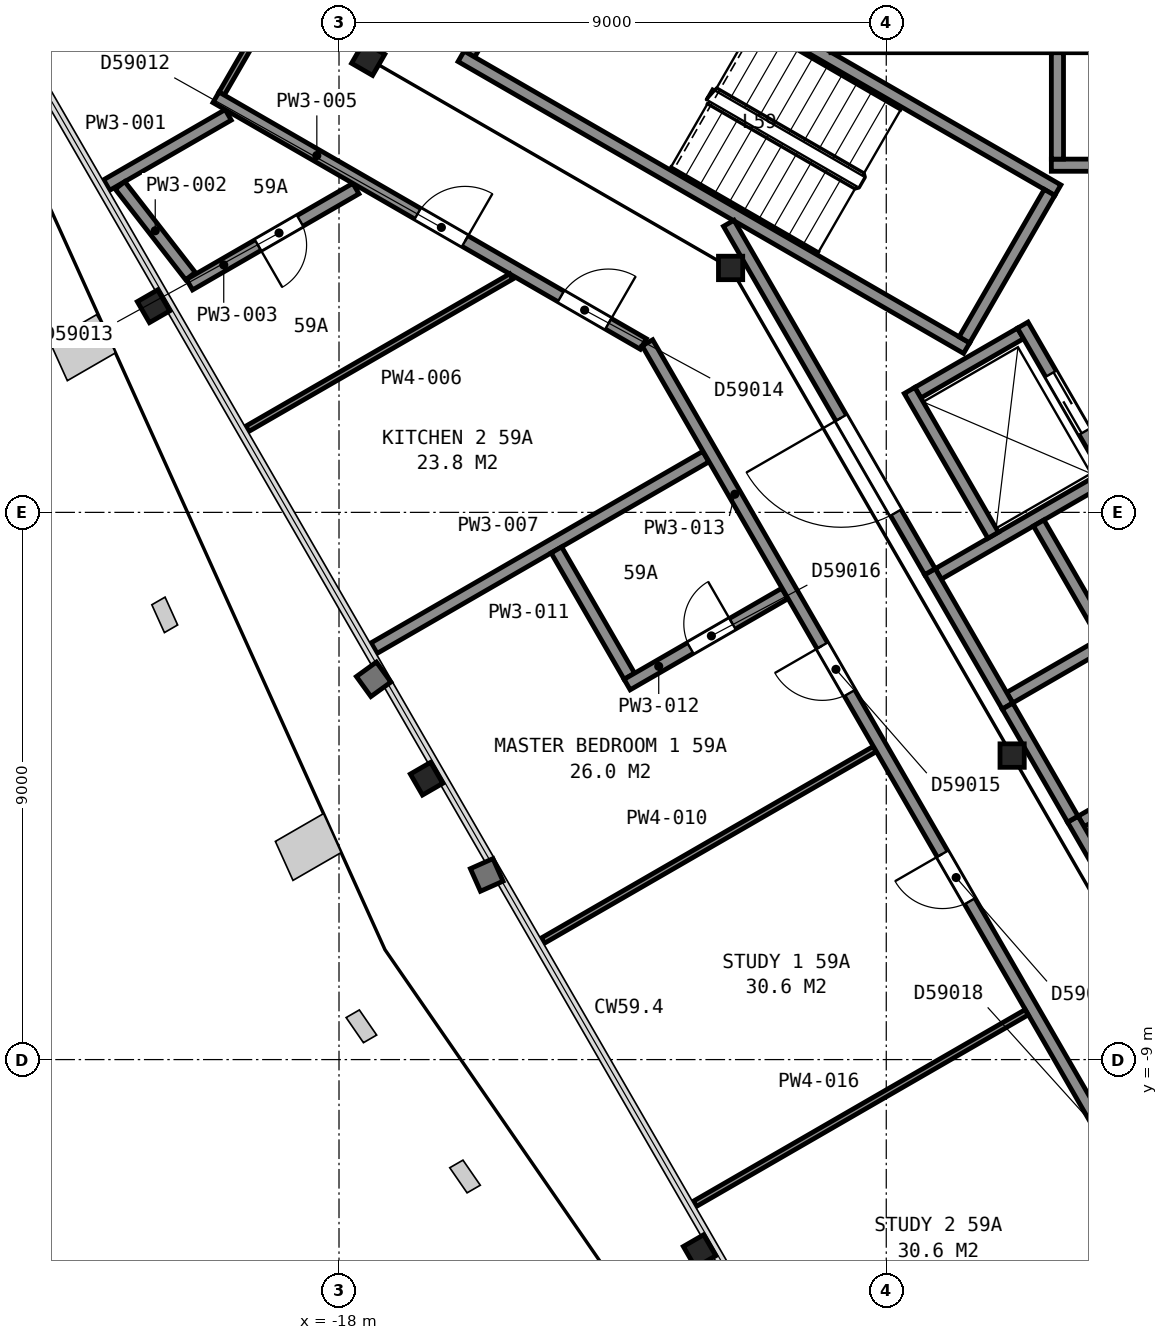
"""IFC4 building model, lengths in metres.
Left out: names, types, materials, properties, quantities, classifications, styles, units other than length and angle.
Written with IfcOpenShell. Run it as: python <this file> out.ifc"""

import sys

from ifc_helpers import new_model, si_unit, direction, frame, frame_2d, origin, origin_2d, place, context, subcontext, project, spatial, rectangle, i_section, extrude, element, fill, save


model = new_model("IFC4")
c1 = context("Model", 3, precision=1e-05, world=origin(), true_north=direction((0.0, 1.0)))
c2 = subcontext(c1, "Body", "Model", "MODEL_VIEW")
j1 = project(units=[si_unit("LENGTHUNIT", "METRE"), si_unit("PLANEANGLEUNIT", "RADIAN")], contexts=[c1])
p1 = place(None, origin())
s1 = spatial("IfcSite", under=j1, at=p1, CompositionType="ELEMENT")
p2 = place(p1, origin())
s2 = spatial("IfcBuilding", under=s1, at=p2, CompositionType="ELEMENT")
p3 = place(p2, frame((0.0, 0.0, 236.0)))
s3 = spatial("IfcBuildingStorey", under=s2, at=p3, CompositionType="ELEMENT", Elevation=236.0)
p4 = place(p3, frame((-21.05, 3.39, 0.04), z_axis=(0.0, 0.0, 1.0), x_axis=(-0.5, 0.866025403784, 0.0)))
e1 = element("IfcColumn", 1, at=p4, inside=s3, PredefinedType="COLUMN", context=c2, shape_type="SweptSolid", body=[
    extrude(i_section(OverallWidth=0.399, OverallDepth=0.386, WebThickness=0.021, FlangeThickness=0.033, FilletRadius=0.015, at=origin_2d()), origin(), (0.0, 0.0, 1.0), 3.66),
])
for number, where, z_axis, x_axis in (
    (2, (-16.56, -4.38, 0.035), (0.0, 0.0, 1.0), (-0.5, 0.866, 0.0)),
    (3, (-12.07, -12.15, 0.035), (0.0, 0.0, 1.0), (-0.5, 0.866, 0.0)),
):
    element("IfcColumn", number, at=place(p3, frame(where, z_axis=z_axis, x_axis=x_axis)), inside=s3, PredefinedType="COLUMN", context=c2, shape_type="SweptSolid", body=[
        extrude(i_section(OverallWidth=0.399, OverallDepth=0.386, WebThickness=0.021, FlangeThickness=0.033, FilletRadius=0.015, at=origin_2d()), origin(), (0.0, 0.0, 1.0), 3.665),
    ])
p5 = place(p3, frame((-17.52, 7.46, 0.0), z_axis=(0.0, 0.0, 1.0), x_axis=(0.5, 0.866025403784, 0.0)))
e4 = element("IfcColumn", 4, at=p5, inside=s3, PredefinedType="COLUMN", context=c2, shape_type="SweptSolid", body=[
    extrude(i_section(OverallWidth=0.401, OverallDepth=0.399, WebThickness=0.025, FlangeThickness=0.04, FilletRadius=0.015, at=origin_2d()), origin(), (0.0, 0.0, 1.0), 3.7),
])
for number, where, z_axis, x_axis in (
    (5, (-11.56, 4.02, 0.0), (0.0, 0.0, 1.0), (1.0, 0.0, 0.0)),
    (6, (-6.93, -4.0, 0.0), (0.0, 0.0, 1.0), (1.0, 0.0, 0.0)),
):
    element("IfcColumn", number, at=place(p3, frame(where, z_axis=z_axis, x_axis=x_axis)), inside=s3, PredefinedType="COLUMN", context=c2, shape_type="SweptSolid", body=[
        extrude(i_section(OverallWidth=0.399, OverallDepth=0.386, WebThickness=0.021, FlangeThickness=0.033, FilletRadius=0.015, at=origin_2d()), origin(), (0.0, 0.0, 1.0), 3.7),
    ])
p6 = place(p3, frame((-14.455, 9.962, 0.0), z_axis=(0.0, 0.0, 1.0), x_axis=(-0.500049511043, -0.865996816683, 0.0)))
e7 = element("IfcWall", 7, at=p6, inside=s3, PredefinedType="PARTITIONING", context=c2, shape_type="SweptSolid", body=[
    extrude(rectangle(XDim=2.8, YDim=0.2, at=frame_2d((1.4, 0.0))), origin(), (0.0, 0.0, 1.0), 3.45),
])
p7 = place(p6, frame((0.85, 0.0, 0.0)))
e8 = element("IfcOpeningElement", 8, at=p7, cuts=e7, PredefinedType="OPENING", context=c2, shape_type="SweptSolid", body=[
    extrude(rectangle(XDim=1.1, YDim=2.1, at=frame_2d((0.55, 1.05))), frame((0.0, 0.11, 0.0), z_axis=(0.0, -1.0, 0.0), x_axis=(1.0, 0.0, 0.0)), (0.0, 0.0, 1.0), 0.22),
])
for number, where, z_axis, x_axis in (
    (9, (-7.678, 2.701, 0.0), (0.0, 0.0, 1.0), (-0.866, 0.5, 0.0)),
    (10, (-6.178, 5.299, 0.0), (0.0, 0.0, 1.0), (-0.866, 0.5, 0.0)),
):
    element("IfcWall", number, at=place(p3, frame(where, z_axis=z_axis, x_axis=x_axis)), inside=s3, PredefinedType="PARTITIONING", context=c2, shape_type="SweptSolid", body=[
        extrude(rectangle(XDim=9.6, YDim=0.2, at=frame_2d((4.8, 0.0))), origin(), (0.0, 0.0, 1.0), 3.45),
    ])
p8 = place(p3, frame((-6.315, 5.262, 0.0), z_axis=(0.0, 0.0, 1.0), x_axis=(-0.500049511043, -0.865996816683, 0.0)))
e11 = element("IfcWall", 11, at=p8, inside=s3, PredefinedType="PARTITIONING", context=c2, shape_type="SweptSolid", body=[
    extrude(rectangle(XDim=2.8, YDim=0.2, at=frame_2d((1.4, 0.0))), origin(), (0.0, 0.0, 1.0), 3.45),
])
for number, where, z_axis, x_axis in (
    (12, (-6.285, 5.71, 0.0), (0.0, 0.0, 1.0), (1.0, 0.0, 0.0)),
    (13, (-6.285, 7.66, 0.0), (0.0, 0.0, 1.0), (1.0, 0.0, 0.0)),
):
    element("IfcWall", number, at=place(p3, frame(where, z_axis=z_axis, x_axis=x_axis)), inside=s3, PredefinedType="PARTITIONING", context=c2, shape_type="SweptSolid", body=[
        extrude(rectangle(XDim=2.35, YDim=0.2, at=frame_2d((1.175, 0.0))), origin(), (0.0, 0.0, 1.0), 3.7),
    ])
for number, where, z_axis, x_axis in (
    (14, (-5.795, -5.083, 0.0), (0.0, 0.0, 1.0), (0.866, 0.5, 0.0)),
    (15, (-6.97, -3.048, 0.0), (0.0, 0.0, 1.0), (0.866, 0.5, 0.0)),
):
    element("IfcWall", number, at=place(p3, frame(where, z_axis=z_axis, x_axis=x_axis)), inside=s3, PredefinedType="PARTITIONING", context=c2, shape_type="SweptSolid", body=[
        extrude(rectangle(XDim=1.75, YDim=0.2, at=frame_2d((0.875, 0.0))), origin(), (0.0, 0.0, 1.0), 3.7),
    ])
p9 = place(p3, frame((-8.145, -1.013, 0.0), z_axis=(0.0, 0.0, 1.0), x_axis=(0.866016494683, 0.500015430699, 0.0)))
e16 = element("IfcWall", 16, at=p9, inside=s3, PredefinedType="PARTITIONING", context=c2, shape_type="SweptSolid", body=[
    extrude(rectangle(XDim=3.15, YDim=0.2, at=frame_2d((1.575, 0.0))), origin(), (0.0, 0.0, 1.0), 3.7),
])
p10 = place(p3, frame((-8.48, 1.969, 0.0), z_axis=(0.0, 0.0, 1.0), x_axis=(0.866000020948, 0.500043961785, 0.0)))
e17 = element("IfcWall", 17, at=p10, inside=s3, PredefinedType="PARTITIONING", context=c2, shape_type="SweptSolid", body=[
    extrude(rectangle(XDim=1.95, YDim=0.2, at=frame_2d((0.975, 0.0))), origin(), (0.0, 0.0, 1.0), 3.7),
])
p11 = place(p3, frame((-6.185, 5.81, 0.0), z_axis=(0.0, 0.0, 1.0), x_axis=(0.0, 1.0, 0.0)))
e18 = element("IfcWall", 18, at=p11, inside=s3, PredefinedType="PARTITIONING", context=c2, shape_type="SweptSolid", body=[
    extrude(rectangle(XDim=1.75, YDim=0.2, at=frame_2d((0.875, 0.0))), origin(), (0.0, 0.0, 1.0), 3.7),
])
p12 = place(p3, frame((-5.28, 0.525, 0.0), z_axis=(0.0, 0.0, 1.0), x_axis=(-0.500037662692, 0.866003658127, 0.0)))
e19 = element("IfcWall", 19, at=p12, inside=s3, PredefinedType="PARTITIONING", context=c2, shape_type="SweptSolid", body=[
    extrude(rectangle(XDim=2.95, YDim=0.2, at=frame_2d((1.475, 0.0))), origin(), (0.0, 0.0, 1.0), 3.7),
])
p13 = place(p12, frame((0.925, 0.0, 0.0)))
e20 = element("IfcOpeningElement", 20, at=p13, cuts=e19, PredefinedType="OPENING", context=c2, shape_type="SweptSolid", body=[
    extrude(rectangle(XDim=1.1, YDim=2.1, at=frame_2d((0.55, 1.05))), frame((0.0, 0.11, 0.0), z_axis=(0.0, -1.0, 0.0), x_axis=(1.0, 0.0, 0.0)), (0.0, 0.0, 1.0), 0.22),
])
p14 = place(p3, frame((-5.318, -2.21, 0.0), z_axis=(0.0, 0.0, 1.0), x_axis=(-0.499938297808, 0.866061024631, 0.0)))
e21 = element("IfcWall", 21, at=p14, inside=s3, PredefinedType="PARTITIONING", context=c2, shape_type="SweptSolid", body=[
    extrude(rectangle(XDim=2.35, YDim=0.2, at=frame_2d((1.175, 0.0))), origin(), (0.0, 0.0, 1.0), 3.7),
])
p15 = place(p3, frame((-7.242, -0.376, 0.0), z_axis=(0.0, 0.0, 1.0), x_axis=(-0.499996545922, 0.866027397988, 0.0)))
e22 = element("IfcWall", 22, at=p15, inside=s3, PredefinedType="PARTITIONING", context=c2, shape_type="SweptSolid", body=[
    extrude(rectangle(XDim=2.75, YDim=0.2, at=frame_2d((1.375, 0.0))), origin(), (0.0, 0.0, 1.0), 3.7),
])
for number, where, z_axis, x_axis in (
    (23, (-4.656, -7.255, 0.0), (0.0, 0.0, 1.0), (-0.5, 0.866, 0.0)),
    (24, (-7.006, -3.185, 0.0), (0.0, 0.0, 1.0), (-0.5, 0.866, 0.0)),
):
    element("IfcWall", number, at=place(p3, frame(where, z_axis=z_axis, x_axis=x_axis)), inside=s3, PredefinedType="PARTITIONING", context=c2, shape_type="SweptSolid", body=[
        extrude(rectangle(XDim=2.55, YDim=0.2, at=frame_2d((1.275, 0.0))), origin(), (0.0, 0.0, 1.0), 3.7),
    ])
p16 = place(p3, frame((-11.591, 4.755, 0.0), z_axis=(0.0, 0.0, 1.0), x_axis=(0.500043977787, -0.866000011708, 0.0)))
e25 = element("IfcWall", 25, at=p16, inside=s3, PredefinedType="PARTITIONING", context=c2, shape_type="SweptSolid", body=[
    extrude(rectangle(XDim=6.617, YDim=0.2, at=frame_2d((3.308, 0.0))), origin(), (0.0, 0.0, 1.0), 3.45),
])
p17 = place(p16, frame((3.695, 0.0, 0.0)))
e26 = element("IfcOpeningElement", 26, at=p17, cuts=e25, PredefinedType="OPENING", context=c2, shape_type="SweptSolid", body=[
    extrude(rectangle(XDim=1.8, YDim=2.1, at=frame_2d((0.9, 1.05))), frame((0.0, 0.11, 0.0), z_axis=(0.0, -1.0, 0.0), x_axis=(1.0, 0.0, 0.0)), (0.0, 0.0, 1.0), 0.22),
])
p18 = place(p3, frame((-9.908, 7.66, 0.0), z_axis=(0.0, 0.0, 1.0), x_axis=(1.0, 0.0, 0.0)))
e27 = element("IfcWall", 27, at=p18, inside=s3, PredefinedType="PARTITIONING", context=c2, shape_type="SweptSolid", body=[
    extrude(rectangle(XDim=3.621, YDim=0.2, at=frame_2d((1.811, 0.0))), origin(), (0.0, 0.0, 1.0), 3.45),
])
p19 = place(p3, frame((-7.005, -3.187, 0.0), z_axis=(0.0, 0.0, 1.0), x_axis=(0.499689606989, -0.866204535123, 0.0)))
e28 = element("IfcWall", 28, at=p19, inside=s3, PredefinedType="PARTITIONING", context=c2, shape_type="SweptSolid", body=[
    extrude(rectangle(XDim=2.145, YDim=0.2, at=frame_2d((1.072, 0.0))), origin(), (0.0, 0.0, 1.0), 3.45),
])
p20 = place(p3, frame((-21.821, 5.384, 0.0), z_axis=(0.0, 0.0, 1.0), x_axis=(0.866178541367, 0.499734664072, 0.0)))
e29 = element("IfcWall", 29, at=p20, inside=s3, PredefinedType="PARTITIONING", context=c2, shape_type="SweptSolid", body=[
    extrude(rectangle(XDim=2.308, YDim=0.2, at=frame_2d((1.154, 0.0))), origin(), (0.0, 0.0, 1.0), 2.713),
])
p21 = place(p3, frame((-21.602, 5.378, 0.0), z_axis=(0.0, 0.0, 1.0), x_axis=(0.613269592497, -0.789873665163, 0.0)))
e30 = element("IfcWall", 30, at=p21, inside=s3, PredefinedType="PARTITIONING", context=c2, shape_type="SweptSolid", body=[
    extrude(rectangle(XDim=1.89, YDim=0.2, at=frame_2d((0.945, 0.0))), origin(), (0.0, 0.0, 1.0), 2.713),
])
p22 = place(p3, frame((-20.458, 3.745, 0.0), z_axis=(0.0, 0.0, 1.0), x_axis=(0.865942402911, 0.500143734182, 0.0)))
e31 = element("IfcWall", 31, at=p22, inside=s3, PredefinedType="PARTITIONING", context=c2, shape_type="SweptSolid", body=[
    extrude(rectangle(XDim=3.16, YDim=0.2, at=frame_2d((1.58, 0.0))), origin(), (0.0, 0.0, 1.0), 2.713),
])
p23 = place(p22, frame((1.3, 0.0, 0.0)))
e32 = element("IfcOpeningElement", 32, at=p23, cuts=e31, PredefinedType="OPENING", context=c2, shape_type="SweptSolid", body=[
    extrude(rectangle(XDim=0.8, YDim=2.1, at=frame_2d((0.4, 1.05))), frame((0.0, 0.11, 0.0), z_axis=(0.0, -1.0, 0.0), x_axis=(1.0, 0.0, 0.0)), (0.0, 0.0, 1.0), 0.22),
])
p24 = place(p3, frame((-19.93, 6.888, 0.0), z_axis=(0.0, 0.0, 1.0), x_axis=(0.500420003794, 0.865782778648, 0.0)))
e33 = element("IfcWall", 33, at=p24, inside=s3, PredefinedType="PARTITIONING", context=c2, shape_type="SweptSolid", body=[
    extrude(rectangle(XDim=7.997, YDim=0.1, at=frame_2d((3.999, 0.0))), origin(), (0.0, 0.0, 1.0), 2.713),
])
p25 = place(p24, frame((3.4, 0.0, 0.0)))
e34 = element("IfcOpeningElement", 34, at=p25, cuts=e33, PredefinedType="OPENING", context=c2, shape_type="SweptSolid", body=[
    extrude(rectangle(XDim=1.2, YDim=2.1, at=frame_2d((0.6, 1.05))), frame((0.0, 0.06, 0.0), z_axis=(0.0, -1.0, 0.0), x_axis=(1.0, 0.0, 0.0)), (0.0, 0.0, 1.0), 0.12),
])
p26 = place(p3, frame((-12.995, 2.77, 0.0), z_axis=(0.0, 0.0, 1.0), x_axis=(-0.866100425926, 0.499870035319, 0.0)))
e35 = element("IfcWall", 35, at=p26, inside=s3, PredefinedType="PARTITIONING", context=c2, shape_type="SweptSolid", body=[
    extrude(rectangle(XDim=8.115, YDim=0.2, at=frame_2d((4.058, 0.0))), origin(), (0.0, 0.0, 1.0), 2.713),
])
p27 = place(p26, frame((3.385, 0.0, 0.0)))
e36 = element("IfcOpeningElement", 36, at=p27, cuts=e35, PredefinedType="OPENING", context=c2, shape_type="SweptSolid", body=[
    extrude(rectangle(XDim=0.9, YDim=2.1, at=frame_2d((0.45, 1.05))), frame((0.0, 0.11, 0.0), z_axis=(0.0, -1.0, 0.0), x_axis=(1.0, 0.0, 0.0)), (0.0, 0.0, 1.0), 0.22),
])
p28 = place(p26, frame((0.665, 0.0, 0.0)))
e37 = element("IfcOpeningElement", 37, at=p28, cuts=e35, PredefinedType="OPENING", context=c2, shape_type="SweptSolid", body=[
    extrude(rectangle(XDim=0.9, YDim=2.1, at=frame_2d((0.45, 1.05))), frame((0.0, 0.11, 0.0), z_axis=(0.0, -1.0, 0.0), x_axis=(1.0, 0.0, 0.0)), (0.0, 0.0, 1.0), 0.22),
])
p29 = place(p3, frame((-19.507, 1.375, 0.0), z_axis=(0.0, 0.0, 1.0), x_axis=(0.86604843891, 0.499960099869, 0.0)))
e38 = element("IfcWall", 38, at=p29, inside=s3, PredefinedType="PARTITIONING", context=c2, shape_type="SweptSolid", body=[
    extrude(rectangle(XDim=5.01, YDim=0.1, at=frame_2d((2.505, 0.0))), origin(), (0.0, 0.0, 1.0), 2.713),
])
p30 = place(p3, frame((-17.423, -2.233, 0.0), z_axis=(0.0, 0.0, 1.0), x_axis=(0.866040369504, 0.499974077718, 0.0)))
e39 = element("IfcWall", 39, at=p30, inside=s3, PredefinedType="PARTITIONING", context=c2, shape_type="SweptSolid", body=[
    extrude(rectangle(XDim=6.299, YDim=0.2, at=frame_2d((3.149, 0.0))), origin(), (0.0, 0.0, 1.0), 2.713),
])
p31 = place(p3, frame((-14.646, -7.043, 0.0), z_axis=(0.0, 0.0, 1.0), x_axis=(0.866066838318, 0.499928226415, 0.0)))
e40 = element("IfcWall", 40, at=p31, inside=s3, PredefinedType="PARTITIONING", context=c2, shape_type="SweptSolid", body=[
    extrude(rectangle(XDim=6.299, YDim=0.1, at=frame_2d((3.15, 0.0))), origin(), (0.0, 0.0, 1.0), 2.713),
])
p32 = place(p3, frame((-14.425, -0.618, 0.0), z_axis=(0.0, 0.0, 1.0), x_axis=(0.500133489192, -0.865948320045, 0.0)))
e41 = element("IfcWall", 41, at=p32, inside=s3, PredefinedType="PARTITIONING", context=c2, shape_type="SweptSolid", body=[
    extrude(rectangle(XDim=2.399, YDim=0.2, at=frame_2d((1.2, 0.0))), origin(), (0.0, 0.0, 1.0), 2.713),
])
p33 = place(p3, frame((-13.262, -2.832, 0.0), z_axis=(0.0, 0.0, 1.0), x_axis=(0.86601725921, 0.500014106551, 0.0)))
e42 = element("IfcWall", 42, at=p33, inside=s3, PredefinedType="PARTITIONING", context=c2, shape_type="SweptSolid", body=[
    extrude(rectangle(XDim=2.995, YDim=0.2, at=frame_2d((1.498, 0.0))), origin(), (0.0, 0.0, 1.0), 2.713),
])
p34 = place(p33, frame((1.2, 0.0, 0.0)))
e43 = element("IfcOpeningElement", 43, at=p34, cuts=e42, PredefinedType="OPENING", context=c2, shape_type="SweptSolid", body=[
    extrude(rectangle(XDim=0.8, YDim=2.1, at=frame_2d((0.4, 1.05))), frame((0.0, 0.11, 0.0), z_axis=(0.0, -1.0, 0.0), x_axis=(1.0, 0.0, 0.0)), (0.0, 0.0, 1.0), 0.22),
])
p35 = place(p3, frame((-4.077, -12.543, 0.0), z_axis=(0.0, 0.0, 1.0), x_axis=(-0.499968768298, 0.866043434665, 0.0)))
e44 = element("IfcWall", 44, at=p35, inside=s3, PredefinedType="PARTITIONING", context=c2, shape_type="SweptSolid", body=[
    extrude(rectangle(XDim=17.703, YDim=0.2, at=frame_2d((8.852, 0.0))), origin(), (0.0, 0.0, 1.0), 2.713),
])
p36 = place(p35, frame((11.052, 0.0, 0.0)))
e45 = element("IfcOpeningElement", 45, at=p36, cuts=e44, PredefinedType="OPENING", context=c2, shape_type="SweptSolid", body=[
    extrude(rectangle(XDim=0.9, YDim=2.1, at=frame_2d((0.45, 1.05))), frame((0.0, 0.11, 0.0), z_axis=(0.0, -1.0, 0.0), x_axis=(1.0, 0.0, 0.0)), (0.0, 0.0, 1.0), 0.22),
])
p37 = place(p35, frame((7.098, 0.0, 0.0)))
e46 = element("IfcOpeningElement", 46, at=p37, cuts=e44, PredefinedType="OPENING", context=c2, shape_type="SweptSolid", body=[
    extrude(rectangle(XDim=0.9, YDim=2.1, at=frame_2d((0.45, 1.05))), frame((0.0, 0.11, 0.0), z_axis=(0.0, -1.0, 0.0), x_axis=(1.0, 0.0, 0.0)), (0.0, 0.0, 1.0), 0.22),
])
p38 = place(p35, frame((2.099, 0.0, 0.0)))
e47 = element("IfcOpeningElement", 47, at=p38, cuts=e44, PredefinedType="OPENING", context=c2, shape_type="SweptSolid", body=[
    extrude(rectangle(XDim=0.9, YDim=2.1, at=frame_2d((0.45, 1.05))), frame((0.0, 0.11, 0.0), z_axis=(0.0, -1.0, 0.0), x_axis=(1.0, 0.0, 0.0)), (0.0, 0.0, 1.0), 0.22),
])
p39 = place(p3, frame((-12.147, -11.372, 0.0), z_axis=(0.0, 0.0, 1.0), x_axis=(0.866013897511, 0.50001992892, 0.0)))
e48 = element("IfcWall", 48, at=p39, inside=s3, PredefinedType="PARTITIONING", context=c2, shape_type="SweptSolid", body=[
    extrude(rectangle(XDim=6.299, YDim=0.1, at=frame_2d((3.149, 0.0))), origin(), (0.0, 0.0, 1.0), 2.713),
])
p40 = place(p13, origin())
e49 = element("IfcDoor", 49, at=p40, inside=s3, OperationType="SLIDING_TO_LEFT", PredefinedType="DOOR", context=c2, shape_type="SweptSolid", body=[
    extrude(rectangle(XDim=1.1, YDim=2.1, at=frame_2d((0.55, 1.05))), frame((0.0, 0.025, 0.0), z_axis=(0.0, -1.0, 0.0), x_axis=(1.0, 0.0, 0.0)), (0.0, 0.0, 1.0), 0.05),
])
fill(e20, e49)
p41 = place(p17, origin())
e50 = element("IfcDoor", 50, at=p41, inside=s3, OperationType="DOUBLE_DOOR_SINGLE_SWING", PredefinedType="DOOR", context=c2, shape_type="SweptSolid", body=[
    extrude(rectangle(XDim=1.8, YDim=2.1, at=frame_2d((0.9, 1.05))), frame((0.0, 0.025, 0.0), z_axis=(0.0, -1.0, 0.0), x_axis=(1.0, 0.0, 0.0)), (0.0, 0.0, 1.0), 0.05),
])
fill(e26, e50)
p42 = place(p23, origin())
e51 = element("IfcDoor", 51, at=p42, inside=s3, OperationType="SINGLE_SWING_LEFT", PredefinedType="DOOR", context=c2, shape_type="SweptSolid", body=[
    extrude(rectangle(XDim=0.8, YDim=2.1, at=frame_2d((0.4, 1.05))), frame((0.0, 0.025, 0.0), z_axis=(0.0, -1.0, 0.0), x_axis=(1.0, 0.0, 0.0)), (0.0, 0.0, 1.0), 0.05),
])
fill(e32, e51)
p43 = place(p27, origin())
e52 = element("IfcDoor", 52, at=p43, inside=s3, OperationType="SINGLE_SWING_LEFT", PredefinedType="DOOR", context=c2, shape_type="SweptSolid", body=[
    extrude(rectangle(XDim=0.9, YDim=2.1, at=frame_2d((0.45, 1.05))), frame((0.0, 0.025, 0.0), z_axis=(0.0, -1.0, 0.0), x_axis=(1.0, 0.0, 0.0)), (0.0, 0.0, 1.0), 0.05),
])
fill(e36, e52)
p44 = place(p28, origin())
e53 = element("IfcDoor", 53, at=p44, inside=s3, OperationType="SINGLE_SWING_LEFT", PredefinedType="DOOR", context=c2, shape_type="SweptSolid", body=[
    extrude(rectangle(XDim=0.9, YDim=2.1, at=frame_2d((0.45, 1.05))), frame((0.0, 0.025, 0.0), z_axis=(0.0, -1.0, 0.0), x_axis=(1.0, 0.0, 0.0)), (0.0, 0.0, 1.0), 0.05),
])
fill(e37, e53)
p45 = place(p34, origin())
e54 = element("IfcDoor", 54, at=p45, inside=s3, OperationType="SINGLE_SWING_RIGHT", PredefinedType="DOOR", context=c2, shape_type="SweptSolid", body=[
    extrude(rectangle(XDim=0.8, YDim=2.1, at=frame_2d((0.4, 1.05))), frame((0.0, 0.025, 0.0), z_axis=(0.0, -1.0, 0.0), x_axis=(1.0, 0.0, 0.0)), (0.0, 0.0, 1.0), 0.05),
])
fill(e43, e54)
p46 = place(p36, origin())
e55 = element("IfcDoor", 55, at=p46, inside=s3, OperationType="SINGLE_SWING_RIGHT", PredefinedType="DOOR", context=c2, shape_type="SweptSolid", body=[
    extrude(rectangle(XDim=0.9, YDim=2.1, at=frame_2d((0.45, 1.05))), frame((0.0, 0.025, 0.0), z_axis=(0.0, -1.0, 0.0), x_axis=(1.0, 0.0, 0.0)), (0.0, 0.0, 1.0), 0.05),
])
fill(e45, e55)
p47 = place(p37, origin())
e56 = element("IfcDoor", 56, at=p47, inside=s3, OperationType="SINGLE_SWING_RIGHT", PredefinedType="DOOR", context=c2, shape_type="SweptSolid", body=[
    extrude(rectangle(XDim=0.9, YDim=2.1, at=frame_2d((0.45, 1.05))), frame((0.0, 0.025, 0.0), z_axis=(0.0, -1.0, 0.0), x_axis=(1.0, 0.0, 0.0)), (0.0, 0.0, 1.0), 0.05),
])
fill(e46, e56)
save(model, sys.argv[1])
